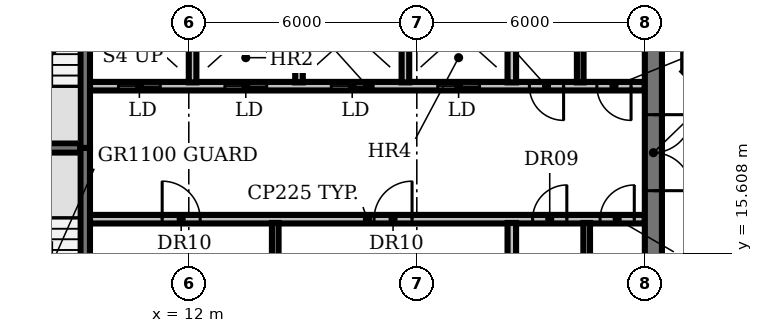
"""IFC4 building model, lengths in metres.
Left out: names, types, materials, properties, quantities, classifications, styles, units other than length and angle.
Written with IfcOpenShell. Run it as: python <this file> out.ifc"""

import sys

from ifc_helpers import new_model, si_unit, direction, frame, frame_2d, origin, place, context, subcontext, project, spatial, rectangle, extrude, element, fill, save


model = new_model("IFC4")
c1 = context("Model", 3, precision=1e-05, world=origin(), true_north=direction((0.0, 1.0)))
c2 = subcontext(c1, "Body", "Model", "MODEL_VIEW")
j1 = project(units=[si_unit("LENGTHUNIT", "METRE"), si_unit("PLANEANGLEUNIT", "RADIAN")], contexts=[c1])
p1 = place(None, origin())
s1 = spatial("IfcSite", under=j1, at=p1, CompositionType="ELEMENT")
p2 = place(p1, origin())
s2 = spatial("IfcBuilding", under=s1, at=p2, CompositionType="ELEMENT")
p3 = place(p2, frame((0.0, 0.0, 255.8)))
s3 = spatial("IfcBuildingStorey", under=s2, at=p3, CompositionType="ELEMENT", Elevation=255.8)
p4 = place(p3, frame((9.4, 16.5, 0.0), z_axis=(0.0, 0.0, 1.0), x_axis=(1.0, 0.0, 0.0)))
e1 = element("IfcWall", 1, at=p4, inside=s3, PredefinedType="PARTITIONING", context=c2, shape_type="SweptSolid", body=[
    extrude(rectangle(XDim=14.6, YDim=0.225, at=frame_2d((7.3, 0.0))), origin(), (0.0, 0.0, 1.0), 8.05),
])
p5 = place(p4, frame((1.9, 0.0, 0.0)))
e2 = element("IfcOpeningElement", 2, at=p5, cuts=e1, PredefinedType="OPENING", context=c2, shape_type="SweptSolid", body=[
    extrude(rectangle(XDim=1.0, YDim=2.1, at=frame_2d((0.5, 1.05))), frame((0.0, 0.123, 0.0), z_axis=(0.0, -1.0, 0.0), x_axis=(1.0, 0.0, 0.0)), (0.0, 0.0, 1.0), 0.245),
])
p6 = place(p4, frame((7.475, 0.0, 0.0)))
e3 = element("IfcOpeningElement", 3, at=p6, cuts=e1, PredefinedType="OPENING", context=c2, shape_type="SweptSolid", body=[
    extrude(rectangle(XDim=1.0, YDim=2.1, at=frame_2d((0.5, 1.05))), frame((0.0, 0.123, 0.0), z_axis=(0.0, -1.0, 0.0), x_axis=(1.0, 0.0, 0.0)), (0.0, 0.0, 1.0), 0.245),
])
p7 = place(p4, frame((11.647, 0.0, 0.0)))
e4 = element("IfcOpeningElement", 4, at=p7, cuts=e1, PredefinedType="OPENING", context=c2, shape_type="SweptSolid", body=[
    extrude(rectangle(XDim=0.9, YDim=2.1, at=frame_2d((0.45, 1.05))), frame((0.0, 0.123, 0.0), z_axis=(0.0, -1.0, 0.0), x_axis=(1.0, 0.0, 0.0)), (0.0, 0.0, 1.0), 0.245),
])
p8 = place(p4, frame((13.423, 0.0, 0.0)))
e5 = element("IfcOpeningElement", 5, at=p8, cuts=e1, PredefinedType="OPENING", context=c2, shape_type="SweptSolid", body=[
    extrude(rectangle(XDim=0.9, YDim=2.1, at=frame_2d((0.45, 1.05))), frame((0.0, 0.123, 0.0), z_axis=(0.0, -1.0, 0.0), x_axis=(1.0, 0.0, 0.0)), (0.0, 0.0, 1.0), 0.245),
])
p9 = place(p3, frame((6.0, 18.375, 0.0), z_axis=(0.0, 0.0, 1.0), x_axis=(1.0, 0.0, 0.0)))
e6 = element("IfcWall", 6, at=p9, inside=s3, PredefinedType="SHEAR", context=c2, shape_type="SweptSolid", body=[
    extrude(rectangle(XDim=3.15, YDim=0.25, at=frame_2d((1.575, 0.0))), origin(), (0.0, 0.0, 1.0), 8.05),
])
p10 = place(p3, frame((24.0, 20.0, 0.0), z_axis=(0.0, 0.0, 1.0), x_axis=(-1.0, 0.0, 0.0)))
e7 = element("IfcWall", 7, at=p10, inside=s3, PredefinedType="PARTITIONING", context=c2, shape_type="SweptSolid", body=[
    extrude(rectangle(XDim=14.6, YDim=0.225, at=frame_2d((7.3, 0.0))), origin(), (0.0, 0.0, 1.0), 8.05),
])
p11 = place(p10, frame((12.75, 0.0, 0.0)))
e8 = element("IfcOpeningElement", 8, at=p11, cuts=e7, PredefinedType="OPENING", context=c2, shape_type="SweptSolid", body=[
    extrude(rectangle(XDim=1.1, YDim=2.1, at=frame_2d((0.55, 1.05))), frame((0.0, 0.123, 0.0), z_axis=(0.0, -1.0, 0.0), x_axis=(1.0, 0.0, 0.0)), (0.0, 0.0, 1.0), 0.245),
])
p12 = place(p10, frame((9.95, 0.0, 0.0)))
e9 = element("IfcOpeningElement", 9, at=p12, cuts=e7, PredefinedType="OPENING", context=c2, shape_type="SweptSolid", body=[
    extrude(rectangle(XDim=1.1, YDim=2.1, at=frame_2d((0.55, 1.05))), frame((0.0, 0.123, 0.0), z_axis=(0.0, -1.0, 0.0), x_axis=(1.0, 0.0, 0.0)), (0.0, 0.0, 1.0), 0.245),
])
p13 = place(p10, frame((7.15, 0.0, 0.0)))
e10 = element("IfcOpeningElement", 10, at=p13, cuts=e7, PredefinedType="OPENING", context=c2, shape_type="SweptSolid", body=[
    extrude(rectangle(XDim=1.1, YDim=2.1, at=frame_2d((0.55, 1.05))), frame((0.0, 0.123, 0.0), z_axis=(0.0, -1.0, 0.0), x_axis=(1.0, 0.0, 0.0)), (0.0, 0.0, 1.0), 0.245),
])
p14 = place(p10, frame((4.35, 0.0, 0.0)))
e11 = element("IfcOpeningElement", 11, at=p14, cuts=e7, PredefinedType="OPENING", context=c2, shape_type="SweptSolid", body=[
    extrude(rectangle(XDim=1.1, YDim=2.1, at=frame_2d((0.55, 1.05))), frame((0.0, 0.123, 0.0), z_axis=(0.0, -1.0, 0.0), x_axis=(1.0, 0.0, 0.0)), (0.0, 0.0, 1.0), 0.245),
])
p15 = place(p10, frame((2.137, 0.0, 0.0)))
e12 = element("IfcOpeningElement", 12, at=p15, cuts=e7, PredefinedType="OPENING", context=c2, shape_type="SweptSolid", body=[
    extrude(rectangle(XDim=0.9, YDim=2.1, at=frame_2d((0.45, 1.05))), frame((0.0, 0.123, 0.0), z_axis=(0.0, -1.0, 0.0), x_axis=(1.0, 0.0, 0.0)), (0.0, 0.0, 1.0), 0.245),
])
p16 = place(p10, frame((0.363, 0.0, 0.0)))
e13 = element("IfcOpeningElement", 13, at=p16, cuts=e7, PredefinedType="OPENING", context=c2, shape_type="SweptSolid", body=[
    extrude(rectangle(XDim=0.9, YDim=2.1, at=frame_2d((0.45, 1.05))), frame((0.0, 0.123, 0.0), z_axis=(0.0, -1.0, 0.0), x_axis=(1.0, 0.0, 0.0)), (0.0, 0.0, 1.0), 0.245),
])
p17 = place(p3, frame((9.275, 18.375, 0.0), z_axis=(0.0, 0.0, 1.0), x_axis=(0.0, -1.0, 0.0)))
e14 = element("IfcWall", 14, at=p17, inside=s3, PredefinedType="SHEAR", context=c2, shape_type="SweptSolid", body=[
    extrude(rectangle(XDim=6.55, YDim=0.25, at=frame_2d((3.275, 0.0))), origin(), (0.0, 0.0, 1.0), 8.05),
])
p18 = place(p17, frame((5.075, 0.0, 0.0)))
e15 = element("IfcOpeningElement", 15, at=p18, cuts=e14, PredefinedType="OPENING", context=c2, shape_type="SweptSolid", body=[
    extrude(rectangle(XDim=1.0, YDim=2.1, at=frame_2d((0.5, 1.05))), frame((0.0, 0.135, 0.0), z_axis=(0.0, -1.0, 0.0), x_axis=(1.0, 0.0, 0.0)), (0.0, 0.0, 1.0), 0.27),
])
p19 = place(p3, frame((9.275, 18.375, 0.0), z_axis=(0.0, 0.0, 1.0), x_axis=(0.0, 1.0, 0.0)))
e16 = element("IfcWall", 16, at=p19, inside=s3, PredefinedType="SHEAR", context=c2, shape_type="SweptSolid", body=[
    extrude(rectangle(XDim=6.425, YDim=0.25, at=frame_2d((3.212, 0.0))), origin(), (0.0, 0.0, 1.0), 8.05),
])
p20 = place(p3, frame((12.1, 20.1, 0.0), z_axis=(0.0, 0.0, 1.0), x_axis=(0.0, 1.0, 0.0)))
e17 = element("IfcWall", 17, at=p20, inside=s3, PredefinedType="SOLIDWALL", context=c2, shape_type="SweptSolid", body=[
    extrude(rectangle(XDim=2.6, YDim=0.2, at=frame_2d((1.3, 0.0))), origin(), (0.0, 0.0, 1.0), 8.05),
])
p21 = place(p3, frame((14.275, 13.8, 0.0), z_axis=(0.0, 0.0, 1.0), x_axis=(0.0, 1.0, 0.0)))
e18 = element("IfcWall", 18, at=p21, inside=s3, PredefinedType="PARTITIONING", context=c2, shape_type="SweptSolid", body=[
    extrude(rectangle(XDim=2.6, YDim=0.175, at=frame_2d((1.3, 0.0))), origin(), (0.0, 0.0, 1.0), 8.05),
])
for number, where, z_axis, x_axis in (
    (19, (14.9, 20.1, 0.0), (0.0, 0.0, 1.0), (0.0, 1.0, 0.0)),
    (20, (17.7, 20.1, 0.0), (0.0, 0.0, 1.0), (0.0, 1.0, 0.0)),
):
    element("IfcWall", number, at=place(p3, frame(where, z_axis=z_axis, x_axis=x_axis)), inside=s3, PredefinedType="SOLIDWALL", context=c2, shape_type="SweptSolid", body=[
        extrude(rectangle(XDim=2.6, YDim=0.2, at=frame_2d((1.3, 0.0))), origin(), (0.0, 0.0, 1.0), 8.05),
    ])
for number, where, z_axis, x_axis in (
    (21, (20.5, 13.8, 0.0), (0.0, 0.0, 1.0), (0.0, 1.0, 0.0)),
    (22, (20.5, 20.1, 0.0), (0.0, 0.0, 1.0), (0.0, 1.0, 0.0)),
):
    element("IfcWall", number, at=place(p3, frame(where, z_axis=z_axis, x_axis=x_axis)), inside=s3, PredefinedType="PARTITIONING", context=c2, shape_type="SweptSolid", body=[
        extrude(rectangle(XDim=2.6, YDim=0.225, at=frame_2d((1.3, 0.0))), origin(), (0.0, 0.0, 1.0), 8.05),
    ])
for number, where, z_axis, x_axis in (
    (23, (22.3, 20.1, 0.0), (0.0, 0.0, 1.0), (0.0, 1.0, 0.0)),
    (24, (22.47, 13.8, 0.0), (0.0, 0.0, 1.0), (0.0, 1.0, 0.0)),
):
    element("IfcWall", number, at=place(p3, frame(where, z_axis=z_axis, x_axis=x_axis)), inside=s3, PredefinedType="PARTITIONING", context=c2, shape_type="SweptSolid", body=[
        extrude(rectangle(XDim=2.6, YDim=0.175, at=frame_2d((1.3, 0.0))), origin(), (0.0, 0.0, 1.0), 8.05),
    ])
p22 = place(p3, frame((24.225, 25.25, 0.0), z_axis=(0.0, 0.0, 1.0), x_axis=(0.0, -1.0, 0.0)))
e25 = element("IfcWall", 25, at=p22, inside=s3, PredefinedType="SHEAR", context=c2, shape_type="SweptSolid", body=[
    extrude(rectangle(XDim=20.3, YDim=0.45, at=frame_2d((10.15, 0.0))), origin(), (0.0, 0.0, 1.0), 8.05),
])
p23 = place(p22, frame((18.1, 0.0, 0.0)))
e26 = element("IfcOpeningElement", 26, at=p23, cuts=e25, PredefinedType="OPENING", context=c2, shape_type="SweptSolid", body=[
    extrude(rectangle(XDim=1.5, YDim=2.1, at=frame_2d((0.75, 1.05))), frame((0.0, 0.235, 0.0), z_axis=(0.0, -1.0, 0.0), x_axis=(1.0, 0.0, 0.0)), (0.0, 0.0, 1.0), 0.47),
])
p24 = place(p22, frame((12.0, 0.0, 0.0)))
e27 = element("IfcOpeningElement", 27, at=p24, cuts=e25, PredefinedType="OPENING", context=c2, shape_type="SweptSolid", body=[
    extrude(rectangle(XDim=0.9, YDim=2.1, at=frame_2d((0.45, 1.05))), frame((0.0, 0.235, 0.0), z_axis=(0.0, -1.0, 0.0), x_axis=(1.0, 0.0, 0.0)), (0.0, 0.0, 1.0), 0.47),
])
p25 = place(p22, frame((6.0, 0.0, 0.0)))
e28 = element("IfcOpeningElement", 28, at=p25, cuts=e25, PredefinedType="OPENING", context=c2, shape_type="SweptSolid", body=[
    extrude(rectangle(XDim=2.0, YDim=2.1, at=frame_2d((1.0, 1.05))), frame((0.0, 0.235, 0.0), z_axis=(0.0, -1.0, 0.0), x_axis=(1.0, 0.0, 0.0)), (0.0, 0.0, 1.0), 0.47),
])
p26 = place(p5, origin())
e29 = element("IfcDoor", 29, at=p26, inside=s3, OperationType="SINGLE_SWING_LEFT", PredefinedType="DOOR", context=c2, shape_type="SweptSolid", body=[
    extrude(rectangle(XDim=1.0, YDim=2.1, at=frame_2d((0.5, 1.05))), frame((0.0, 0.025, 0.0), z_axis=(0.0, -1.0, 0.0), x_axis=(1.0, 0.0, 0.0)), (0.0, 0.0, 1.0), 0.05),
])
fill(e2, e29)
p27 = place(p6, origin())
e30 = element("IfcDoor", 30, at=p27, inside=s3, OperationType="SINGLE_SWING_RIGHT", PredefinedType="DOOR", context=c2, shape_type="SweptSolid", body=[
    extrude(rectangle(XDim=1.0, YDim=2.1, at=frame_2d((0.5, 1.05))), frame((0.0, 0.025, 0.0), z_axis=(0.0, -1.0, 0.0), x_axis=(1.0, 0.0, 0.0)), (0.0, 0.0, 1.0), 0.05),
])
fill(e3, e30)
p28 = place(p7, origin())
e31 = element("IfcDoor", 31, at=p28, inside=s3, OperationType="SINGLE_SWING_RIGHT", PredefinedType="DOOR", context=c2, shape_type="SweptSolid", body=[
    extrude(rectangle(XDim=0.9, YDim=2.1, at=frame_2d((0.45, 1.05))), frame((0.0, 0.025, 0.0), z_axis=(0.0, -1.0, 0.0), x_axis=(1.0, 0.0, 0.0)), (0.0, 0.0, 1.0), 0.05),
])
fill(e4, e31)
p29 = place(p8, origin())
e32 = element("IfcDoor", 32, at=p29, inside=s3, OperationType="SINGLE_SWING_RIGHT", PredefinedType="DOOR", context=c2, shape_type="SweptSolid", body=[
    extrude(rectangle(XDim=0.9, YDim=2.1, at=frame_2d((0.45, 1.05))), frame((0.0, 0.025, 0.0), z_axis=(0.0, -1.0, 0.0), x_axis=(1.0, 0.0, 0.0)), (0.0, 0.0, 1.0), 0.05),
])
fill(e5, e32)
p30 = place(p11, origin())
e33 = element("IfcDoor", 33, at=p30, inside=s3, OperationType="DOUBLE_DOOR_SLIDING", PredefinedType="DOOR", context=c2, shape_type="SweptSolid", body=[
    extrude(rectangle(XDim=1.1, YDim=2.1, at=frame_2d((0.55, 1.05))), frame((0.0, 0.025, 0.0), z_axis=(0.0, -1.0, 0.0), x_axis=(1.0, 0.0, 0.0)), (0.0, 0.0, 1.0), 0.05),
])
fill(e8, e33)
p31 = place(p12, origin())
e34 = element("IfcDoor", 34, at=p31, inside=s3, OperationType="DOUBLE_DOOR_SLIDING", PredefinedType="DOOR", context=c2, shape_type="SweptSolid", body=[
    extrude(rectangle(XDim=1.1, YDim=2.1, at=frame_2d((0.55, 1.05))), frame((0.0, 0.025, 0.0), z_axis=(0.0, -1.0, 0.0), x_axis=(1.0, 0.0, 0.0)), (0.0, 0.0, 1.0), 0.05),
])
fill(e9, e34)
p32 = place(p13, origin())
e35 = element("IfcDoor", 35, at=p32, inside=s3, OperationType="DOUBLE_DOOR_SLIDING", PredefinedType="DOOR", context=c2, shape_type="SweptSolid", body=[
    extrude(rectangle(XDim=1.1, YDim=2.1, at=frame_2d((0.55, 1.05))), frame((0.0, 0.025, 0.0), z_axis=(0.0, -1.0, 0.0), x_axis=(1.0, 0.0, 0.0)), (0.0, 0.0, 1.0), 0.05),
])
fill(e10, e35)
p33 = place(p14, origin())
e36 = element("IfcDoor", 36, at=p33, inside=s3, OperationType="DOUBLE_DOOR_SLIDING", PredefinedType="DOOR", context=c2, shape_type="SweptSolid", body=[
    extrude(rectangle(XDim=1.1, YDim=2.1, at=frame_2d((0.55, 1.05))), frame((0.0, 0.025, 0.0), z_axis=(0.0, -1.0, 0.0), x_axis=(1.0, 0.0, 0.0)), (0.0, 0.0, 1.0), 0.05),
])
fill(e11, e36)
p34 = place(p15, origin())
e37 = element("IfcDoor", 37, at=p34, inside=s3, OperationType="SINGLE_SWING_LEFT", PredefinedType="DOOR", context=c2, shape_type="SweptSolid", body=[
    extrude(rectangle(XDim=0.9, YDim=2.1, at=frame_2d((0.45, 1.05))), frame((0.0, 0.025, 0.0), z_axis=(0.0, -1.0, 0.0), x_axis=(1.0, 0.0, 0.0)), (0.0, 0.0, 1.0), 0.05),
])
fill(e12, e37)
p35 = place(p16, origin())
e38 = element("IfcDoor", 38, at=p35, inside=s3, OperationType="SINGLE_SWING_LEFT", PredefinedType="DOOR", context=c2, shape_type="SweptSolid", body=[
    extrude(rectangle(XDim=0.9, YDim=2.1, at=frame_2d((0.45, 1.05))), frame((0.0, 0.025, 0.0), z_axis=(0.0, -1.0, 0.0), x_axis=(1.0, 0.0, 0.0)), (0.0, 0.0, 1.0), 0.05),
])
fill(e13, e38)
p36 = place(p25, origin())
e39 = element("IfcDoor", 39, at=p36, inside=s3, OperationType="DOUBLE_DOOR_SINGLE_SWING", PredefinedType="DOOR", context=c2, shape_type="SweptSolid", body=[
    extrude(rectangle(XDim=2.0, YDim=2.1, at=frame_2d((1.0, 1.05))), frame((0.0, 0.025, 0.0), z_axis=(0.0, -1.0, 0.0), x_axis=(1.0, 0.0, 0.0)), (0.0, 0.0, 1.0), 0.05),
])
fill(e28, e39)
save(model, sys.argv[1])
